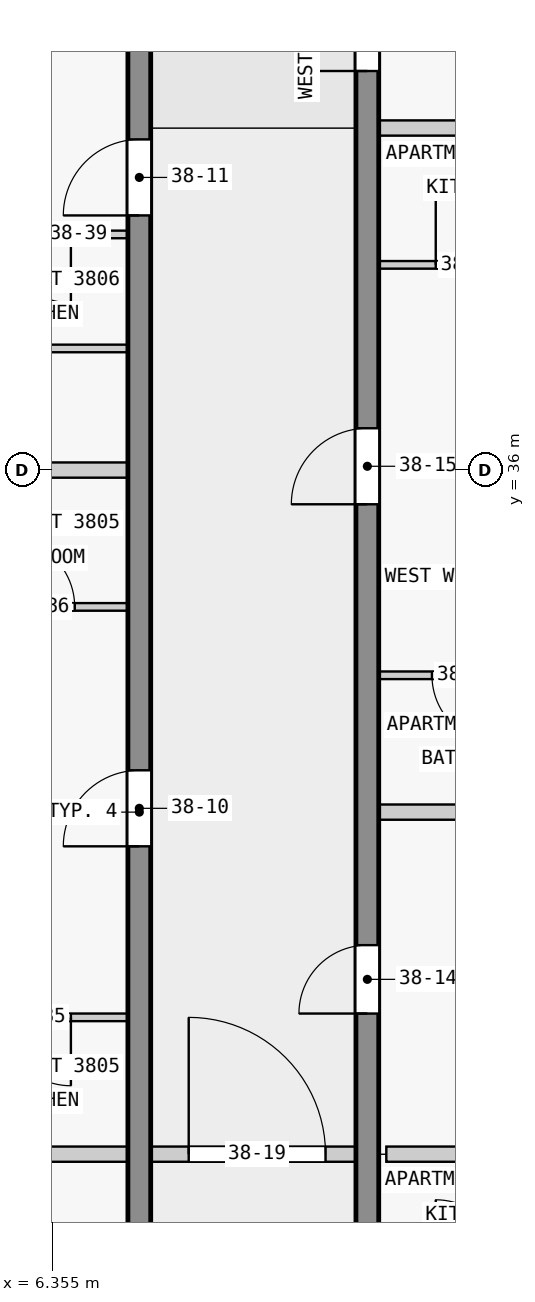
"""IFC4 building model, lengths in metres.
Left out: names, types, materials, properties, quantities, classifications, styles, units other than length and angle.
Written with IfcOpenShell. Run it as: python <this file> out.ifc"""

import sys

from ifc_helpers import new_model, si_unit, direction, frame, frame_2d, origin, place, context, subcontext, project, spatial, rectangle, extrude, element, fill, save


model = new_model("IFC4")
c1 = context("Model", 3, precision=1e-05, world=origin(), true_north=direction((0.0, 1.0)))
c2 = subcontext(c1, "Body", "Model", "MODEL_VIEW")
j1 = project(units=[si_unit("LENGTHUNIT", "METRE"), si_unit("PLANEANGLEUNIT", "RADIAN")], contexts=[c1])
p1 = place(None, origin())
s1 = spatial("IfcSite", under=j1, at=p1, CompositionType="ELEMENT")
p2 = place(p1, origin())
s2 = spatial("IfcBuilding", under=s1, at=p2, CompositionType="ELEMENT")
p3 = place(p2, frame((0.0, 0.0, 149.9)))
s3 = spatial("IfcBuildingStorey", under=s2, at=p3, CompositionType="ELEMENT", Elevation=149.9)
p4 = place(p3, frame((7.5, 18.0, 0.0), z_axis=(0.0, 0.0, 1.0), x_axis=(0.0, 1.0, 0.0)))
e1 = element("IfcWall", 1, at=p4, inside=s3, PredefinedType="SHEAR", context=c2, shape_type="SweptSolid", body=[
    extrude(rectangle(XDim=27.0, YDim=0.3, at=frame_2d((13.5, 0.0))), origin(), (0.0, 0.0, 1.0), 3.25),
])
p5 = place(p4, frame((1.75, 0.0, 0.0)))
e2 = element("IfcOpeningElement", 2, at=p5, cuts=e1, PredefinedType="OPENING", context=c2, shape_type="SweptSolid", body=[
    extrude(rectangle(XDim=1.0, YDim=2.1, at=frame_2d((0.5, 1.05))), frame((0.0, 0.16, 0.0), z_axis=(0.0, -1.0, 0.0), x_axis=(1.0, 0.0, 0.0)), (0.0, 0.0, 1.0), 0.32),
])
p6 = place(p4, frame((5.85, 0.0, 0.0)))
e3 = element("IfcOpeningElement", 3, at=p6, cuts=e1, PredefinedType="OPENING", context=c2, shape_type="SweptSolid", body=[
    extrude(rectangle(XDim=1.8, YDim=2.1, at=frame_2d((0.9, 1.05))), frame((0.0, 0.16, 0.0), z_axis=(0.0, -1.0, 0.0), x_axis=(1.0, 0.0, 0.0)), (0.0, 0.0, 1.0), 0.32),
])
p7 = place(p4, frame((13.05, 0.0, 0.0)))
e4 = element("IfcOpeningElement", 4, at=p7, cuts=e1, PredefinedType="OPENING", context=c2, shape_type="SweptSolid", body=[
    extrude(rectangle(XDim=1.0, YDim=2.1, at=frame_2d((0.5, 1.05))), frame((0.0, 0.16, 0.0), z_axis=(0.0, -1.0, 0.0), x_axis=(1.0, 0.0, 0.0)), (0.0, 0.0, 1.0), 0.32),
])
p8 = place(p4, frame((21.35, 0.0, 0.0)))
e5 = element("IfcOpeningElement", 5, at=p8, cuts=e1, PredefinedType="OPENING", context=c2, shape_type="SweptSolid", body=[
    extrude(rectangle(XDim=1.0, YDim=2.1, at=frame_2d((0.5, 1.05))), frame((0.0, 0.16, 0.0), z_axis=(0.0, -1.0, 0.0), x_axis=(1.0, 0.0, 0.0)), (0.0, 0.0, 1.0), 0.32),
])
p9 = place(p3, frame((10.5, 18.0, 0.0), z_axis=(0.0, 0.0, 1.0), x_axis=(0.0, 1.0, 0.0)))
e6 = element("IfcWall", 6, at=p9, inside=s3, PredefinedType="SHEAR", context=c2, shape_type="SweptSolid", body=[
    extrude(rectangle(XDim=27.0, YDim=0.3, at=frame_2d((13.5, 0.0))), origin(), (0.0, 0.0, 1.0), 3.25),
])
p10 = place(p9, frame((1.85, 0.0, 0.0)))
e7 = element("IfcOpeningElement", 7, at=p10, cuts=e6, PredefinedType="OPENING", context=c2, shape_type="SweptSolid", body=[
    extrude(rectangle(XDim=0.9, YDim=2.1, at=frame_2d((0.45, 1.05))), frame((0.0, 0.16, 0.0), z_axis=(0.0, -1.0, 0.0), x_axis=(1.0, 0.0, 0.0)), (0.0, 0.0, 1.0), 0.32),
])
p11 = place(p9, frame((6.25, 0.0, 0.0)))
e8 = element("IfcOpeningElement", 8, at=p11, cuts=e6, PredefinedType="OPENING", context=c2, shape_type="SweptSolid", body=[
    extrude(rectangle(XDim=1.0, YDim=2.1, at=frame_2d((0.5, 1.05))), frame((0.0, 0.16, 0.0), z_axis=(0.0, -1.0, 0.0), x_axis=(1.0, 0.0, 0.0)), (0.0, 0.0, 1.0), 0.32),
])
p12 = place(p9, frame((10.85, 0.0, 0.0)))
e9 = element("IfcOpeningElement", 9, at=p12, cuts=e6, PredefinedType="OPENING", context=c2, shape_type="SweptSolid", body=[
    extrude(rectangle(XDim=0.9, YDim=2.1, at=frame_2d((0.45, 1.05))), frame((0.0, 0.16, 0.0), z_axis=(0.0, -1.0, 0.0), x_axis=(1.0, 0.0, 0.0)), (0.0, 0.0, 1.0), 0.32),
])
p13 = place(p9, frame((17.55, 0.0, 0.0)))
e10 = element("IfcOpeningElement", 10, at=p13, cuts=e6, PredefinedType="OPENING", context=c2, shape_type="SweptSolid", body=[
    extrude(rectangle(XDim=1.0, YDim=2.1, at=frame_2d((0.5, 1.05))), frame((0.0, 0.16, 0.0), z_axis=(0.0, -1.0, 0.0), x_axis=(1.0, 0.0, 0.0)), (0.0, 0.0, 1.0), 0.32),
])
p14 = place(p9, frame((23.25, 0.0, 0.0)))
e11 = element("IfcOpeningElement", 11, at=p14, cuts=e6, PredefinedType="OPENING", context=c2, shape_type="SweptSolid", body=[
    extrude(rectangle(XDim=0.9, YDim=2.1, at=frame_2d((0.45, 1.05))), frame((0.0, 0.16, 0.0), z_axis=(0.0, -1.0, 0.0), x_axis=(1.0, 0.0, 0.0)), (0.0, 0.0, 1.0), 0.32),
])
p15 = place(p9, frame((25.45, 0.0, 0.0)))
e12 = element("IfcOpeningElement", 12, at=p15, cuts=e6, PredefinedType="OPENING", context=c2, shape_type="SweptSolid", body=[
    extrude(rectangle(XDim=1.0, YDim=2.1, at=frame_2d((0.5, 1.05))), frame((0.0, 0.16, 0.0), z_axis=(0.0, -1.0, 0.0), x_axis=(1.0, 0.0, 0.0)), (0.0, 0.0, 1.0), 0.32),
])
p16 = place(p3, frame((7.35, 27.0, 0.0), z_axis=(0.0, 0.0, 1.0), x_axis=(-1.0, 0.0, 0.0)))
e13 = element("IfcWall", 13, at=p16, inside=s3, PredefinedType="PARTITIONING", context=c2, shape_type="SweptSolid", body=[
    extrude(rectangle(XDim=7.43, YDim=0.2, at=frame_2d((3.715, 0.0))), origin(), (0.0, 0.0, 1.0), 3.25),
])
p17 = place(p3, frame((12.95, 27.0, 0.0), z_axis=(0.0, 0.0, 1.0), x_axis=(-1.0, 0.0, 0.0)))
e14 = element("IfcWall", 14, at=p17, inside=s3, PredefinedType="PARTITIONING", context=c2, shape_type="SweptSolid", body=[
    extrude(rectangle(XDim=2.2, YDim=0.2, at=frame_2d((1.1, 0.0))), origin(), (0.0, 0.0, 1.0), 3.25),
])
p18 = place(p3, frame((7.35, 28.8, 0.0), z_axis=(0.0, 0.0, 1.0), x_axis=(-1.0, 0.0, 0.0)))
e15 = element("IfcWall", 15, at=p18, inside=s3, PredefinedType="PARTITIONING", context=c2, shape_type="SweptSolid", body=[
    extrude(rectangle(XDim=2.4, YDim=0.1, at=frame_2d((1.2, 0.0))), origin(), (0.0, 0.0, 1.0), 3.25),
])
p19 = place(p18, frame((0.75, 0.0, 0.0)))
e16 = element("IfcOpeningElement", 16, at=p19, cuts=e15, PredefinedType="OPENING", context=c2, shape_type="SweptSolid", body=[
    extrude(rectangle(XDim=0.9, YDim=2.1, at=frame_2d((0.45, 1.05))), frame((0.0, 0.06, 0.0), z_axis=(0.0, -1.0, 0.0), x_axis=(1.0, 0.0, 0.0)), (0.0, 0.0, 1.0), 0.12),
])
p20 = place(p3, frame((17.85, 31.5, 0.0), z_axis=(0.0, 0.0, 1.0), x_axis=(-1.0, 0.0, 0.0)))
e17 = element("IfcWall", 17, at=p20, inside=s3, PredefinedType="PARTITIONING", context=c2, shape_type="SweptSolid", body=[
    extrude(rectangle(XDim=7.2, YDim=0.2, at=frame_2d((3.6, 0.0))), origin(), (0.0, 0.0, 1.0), 3.25),
])
p21 = place(p3, frame((13.0, 33.3, 0.0), z_axis=(0.0, 0.0, 1.0), x_axis=(-1.0, 0.0, 0.0)))
e18 = element("IfcWall", 18, at=p21, inside=s3, PredefinedType="PARTITIONING", context=c2, shape_type="SweptSolid", body=[
    extrude(rectangle(XDim=2.35, YDim=0.1, at=frame_2d((1.175, 0.0))), origin(), (0.0, 0.0, 1.0), 3.25),
])
p22 = place(p21, frame((0.75, 0.0, 0.0)))
e19 = element("IfcOpeningElement", 19, at=p22, cuts=e18, PredefinedType="OPENING", context=c2, shape_type="SweptSolid", body=[
    extrude(rectangle(XDim=0.9, YDim=2.1, at=frame_2d((0.45, 1.05))), frame((0.0, 0.06, 0.0), z_axis=(0.0, -1.0, 0.0), x_axis=(1.0, 0.0, 0.0)), (0.0, 0.0, 1.0), 0.12),
])
p23 = place(p3, frame((5.0, 34.2, 0.0), z_axis=(0.0, 0.0, 1.0), x_axis=(1.0, 0.0, 0.0)))
e20 = element("IfcWall", 20, at=p23, inside=s3, PredefinedType="PARTITIONING", context=c2, shape_type="SweptSolid", body=[
    extrude(rectangle(XDim=2.35, YDim=0.1, at=frame_2d((1.175, 0.0))), origin(), (0.0, 0.0, 1.0), 3.25),
])
p24 = place(p23, frame((0.75, 0.0, 0.0)))
e21 = element("IfcOpeningElement", 21, at=p24, cuts=e20, PredefinedType="OPENING", context=c2, shape_type="SweptSolid", body=[
    extrude(rectangle(XDim=0.9, YDim=2.1, at=frame_2d((0.45, 1.05))), frame((0.0, 0.06, 0.0), z_axis=(0.0, -1.0, 0.0), x_axis=(1.0, 0.0, 0.0)), (0.0, 0.0, 1.0), 0.12),
])
p25 = place(p3, frame((7.35, 36.0, 0.0), z_axis=(0.0, 0.0, 1.0), x_axis=(-1.0, 0.0, 0.0)))
e22 = element("IfcWall", 22, at=p25, inside=s3, PredefinedType="PARTITIONING", context=c2, shape_type="SweptSolid", body=[
    extrude(rectangle(XDim=5.95, YDim=0.2, at=frame_2d((2.975, 0.0))), origin(), (0.0, 0.0, 1.0), 3.25),
])
p26 = place(p3, frame((7.35, 37.6, 0.0), z_axis=(0.0, 0.0, 1.0), x_axis=(-1.0, 0.0, 0.0)))
e23 = element("IfcWall", 23, at=p26, inside=s3, PredefinedType="PARTITIONING", context=c2, shape_type="SweptSolid", body=[
    extrude(rectangle(XDim=2.35, YDim=0.1, at=frame_2d((1.175, 0.0))), origin(), (0.0, 0.0, 1.0), 3.25),
])
p27 = place(p3, frame((10.65, 38.7, 0.0), z_axis=(0.0, 0.0, 1.0), x_axis=(1.0, 0.0, 0.0)))
e24 = element("IfcWall", 24, at=p27, inside=s3, PredefinedType="PARTITIONING", context=c2, shape_type="SweptSolid", body=[
    extrude(rectangle(XDim=2.4, YDim=0.1, at=frame_2d((1.2, 0.0))), origin(), (0.0, 0.0, 1.0), 3.25),
])
p28 = place(p27, frame((0.75, 0.0, 0.0)))
e25 = element("IfcOpeningElement", 25, at=p28, cuts=e24, PredefinedType="OPENING", context=c2, shape_type="SweptSolid", body=[
    extrude(rectangle(XDim=0.9, YDim=2.1, at=frame_2d((0.45, 1.05))), frame((0.0, 0.06, 0.0), z_axis=(0.0, -1.0, 0.0), x_axis=(1.0, 0.0, 0.0)), (0.0, 0.0, 1.0), 0.12),
])
p29 = place(p3, frame((7.35, 39.1, 0.0), z_axis=(0.0, 0.0, 1.0), x_axis=(-1.0, 0.0, 0.0)))
e26 = element("IfcWall", 26, at=p29, inside=s3, PredefinedType="PARTITIONING", context=c2, shape_type="SweptSolid", body=[
    extrude(rectangle(XDim=2.35, YDim=0.1, at=frame_2d((1.175, 0.0))), origin(), (0.0, 0.0, 1.0), 3.25),
])
p30 = place(p29, frame((0.75, 0.0, 0.0)))
e27 = element("IfcOpeningElement", 27, at=p30, cuts=e26, PredefinedType="OPENING", context=c2, shape_type="SweptSolid", body=[
    extrude(rectangle(XDim=0.9, YDim=2.1, at=frame_2d((0.45, 1.05))), frame((0.0, 0.06, 0.0), z_axis=(0.0, -1.0, 0.0), x_axis=(1.0, 0.0, 0.0)), (0.0, 0.0, 1.0), 0.12),
])
p31 = place(p3, frame((12.95, 40.5, 0.0), z_axis=(0.0, 0.0, 1.0), x_axis=(-1.0, 0.0, 0.0)))
e28 = element("IfcWall", 28, at=p31, inside=s3, PredefinedType="PARTITIONING", context=c2, shape_type="SweptSolid", body=[
    extrude(rectangle(XDim=2.3, YDim=0.2, at=frame_2d((1.15, 0.0))), origin(), (0.0, 0.0, 1.0), 3.25),
])
p32 = place(p3, frame((7.45, 27.0, 0.0), z_axis=(0.0, 0.0, 1.0), x_axis=(1.0, 0.0, 0.0)))
e29 = element("IfcWall", 29, at=p32, inside=s3, PredefinedType="PARTITIONING", context=c2, shape_type="SweptSolid", body=[
    extrude(rectangle(XDim=3.2, YDim=0.2, at=frame_2d((1.6, 0.0))), origin(), (0.0, 0.0, 1.0), 3.25),
])
p33 = place(p32, frame((0.7, 0.0, 0.0)))
e30 = element("IfcOpeningElement", 30, at=p33, cuts=e29, PredefinedType="OPENING", context=c2, shape_type="SweptSolid", body=[
    extrude(rectangle(XDim=1.8, YDim=2.1, at=frame_2d((0.9, 1.05))), frame((0.0, 0.11, 0.0), z_axis=(0.0, -1.0, 0.0), x_axis=(1.0, 0.0, 0.0)), (0.0, 0.0, 1.0), 0.22),
])
p34 = place(p7, origin())
e31 = element("IfcDoor", 31, at=p34, inside=s3, OperationType="SINGLE_SWING_RIGHT", PredefinedType="DOOR", context=c2, shape_type="SweptSolid", body=[
    extrude(rectangle(XDim=1.0, YDim=2.1, at=frame_2d((0.5, 1.05))), frame((0.0, 0.025, 0.0), z_axis=(0.0, -1.0, 0.0), x_axis=(1.0, 0.0, 0.0)), (0.0, 0.0, 1.0), 0.05),
])
fill(e4, e31)
p35 = place(p8, origin())
e32 = element("IfcDoor", 32, at=p35, inside=s3, OperationType="SINGLE_SWING_RIGHT", PredefinedType="DOOR", context=c2, shape_type="SweptSolid", body=[
    extrude(rectangle(XDim=1.0, YDim=2.1, at=frame_2d((0.5, 1.05))), frame((0.0, 0.025, 0.0), z_axis=(0.0, -1.0, 0.0), x_axis=(1.0, 0.0, 0.0)), (0.0, 0.0, 1.0), 0.05),
])
fill(e5, e32)
p36 = place(p12, origin())
e33 = element("IfcDoor", 33, at=p36, inside=s3, OperationType="SINGLE_SWING_LEFT", PredefinedType="DOOR", context=c2, shape_type="SweptSolid", body=[
    extrude(rectangle(XDim=0.9, YDim=2.1, at=frame_2d((0.45, 1.05))), frame((0.0, 0.025, 0.0), z_axis=(0.0, -1.0, 0.0), x_axis=(1.0, 0.0, 0.0)), (0.0, 0.0, 1.0), 0.05),
])
fill(e9, e33)
p37 = place(p13, origin())
e34 = element("IfcDoor", 34, at=p37, inside=s3, OperationType="SINGLE_SWING_RIGHT", PredefinedType="DOOR", context=c2, shape_type="SweptSolid", body=[
    extrude(rectangle(XDim=1.0, YDim=2.1, at=frame_2d((0.5, 1.05))), frame((0.0, 0.025, 0.0), z_axis=(0.0, -1.0, 0.0), x_axis=(1.0, 0.0, 0.0)), (0.0, 0.0, 1.0), 0.05),
])
fill(e10, e34)
p38 = place(p14, origin())
e35 = element("IfcDoor", 35, at=p38, inside=s3, OperationType="SINGLE_SWING_RIGHT", PredefinedType="DOOR", context=c2, shape_type="SweptSolid", body=[
    extrude(rectangle(XDim=0.9, YDim=2.1, at=frame_2d((0.45, 1.05))), frame((0.0, 0.025, 0.0), z_axis=(0.0, -1.0, 0.0), x_axis=(1.0, 0.0, 0.0)), (0.0, 0.0, 1.0), 0.05),
])
fill(e11, e35)
p39 = place(p33, origin())
e36 = element("IfcDoor", 36, at=p39, inside=s3, OperationType="SINGLE_SWING_LEFT", PredefinedType="DOOR", context=c2, shape_type="SweptSolid", body=[
    extrude(rectangle(XDim=1.8, YDim=2.1, at=frame_2d((0.9, 1.05))), frame((0.0, 0.025, 0.0), z_axis=(0.0, -1.0, 0.0), x_axis=(1.0, 0.0, 0.0)), (0.0, 0.0, 1.0), 0.05),
])
fill(e30, e36)
p40 = place(p19, origin())
e37 = element("IfcDoor", 37, at=p40, inside=s3, OperationType="SINGLE_SWING_RIGHT", PredefinedType="DOOR", context=c2, shape_type="SweptSolid", body=[
    extrude(rectangle(XDim=0.9, YDim=2.1, at=frame_2d((0.45, 1.05))), frame((0.0, 0.025, 0.0), z_axis=(0.0, -1.0, 0.0), x_axis=(1.0, 0.0, 0.0)), (0.0, 0.0, 1.0), 0.05),
])
fill(e16, e37)
p41 = place(p24, origin())
e38 = element("IfcDoor", 38, at=p41, inside=s3, OperationType="SINGLE_SWING_RIGHT", PredefinedType="DOOR", context=c2, shape_type="SweptSolid", body=[
    extrude(rectangle(XDim=0.9, YDim=2.1, at=frame_2d((0.45, 1.05))), frame((0.0, 0.025, 0.0), z_axis=(0.0, -1.0, 0.0), x_axis=(1.0, 0.0, 0.0)), (0.0, 0.0, 1.0), 0.05),
])
fill(e21, e38)
p42 = place(p30, origin())
e39 = element("IfcDoor", 39, at=p42, inside=s3, OperationType="SINGLE_SWING_RIGHT", PredefinedType="DOOR", context=c2, shape_type="SweptSolid", body=[
    extrude(rectangle(XDim=0.9, YDim=2.1, at=frame_2d((0.45, 1.05))), frame((0.0, 0.025, 0.0), z_axis=(0.0, -1.0, 0.0), x_axis=(1.0, 0.0, 0.0)), (0.0, 0.0, 1.0), 0.05),
])
fill(e27, e39)
p43 = place(p22, origin())
e40 = element("IfcDoor", 40, at=p43, inside=s3, OperationType="SINGLE_SWING_RIGHT", PredefinedType="DOOR", context=c2, shape_type="SweptSolid", body=[
    extrude(rectangle(XDim=0.9, YDim=2.1, at=frame_2d((0.45, 1.05))), frame((0.0, 0.025, 0.0), z_axis=(0.0, -1.0, 0.0), x_axis=(1.0, 0.0, 0.0)), (0.0, 0.0, 1.0), 0.05),
])
fill(e19, e40)
p44 = place(p28, origin())
e41 = element("IfcDoor", 41, at=p44, inside=s3, OperationType="SINGLE_SWING_LEFT", PredefinedType="DOOR", context=c2, shape_type="SweptSolid", body=[
    extrude(rectangle(XDim=0.9, YDim=2.1, at=frame_2d((0.45, 1.05))), frame((0.0, 0.025, 0.0), z_axis=(0.0, -1.0, 0.0), x_axis=(1.0, 0.0, 0.0)), (0.0, 0.0, 1.0), 0.05),
])
fill(e25, e41)
save(model, sys.argv[1])
